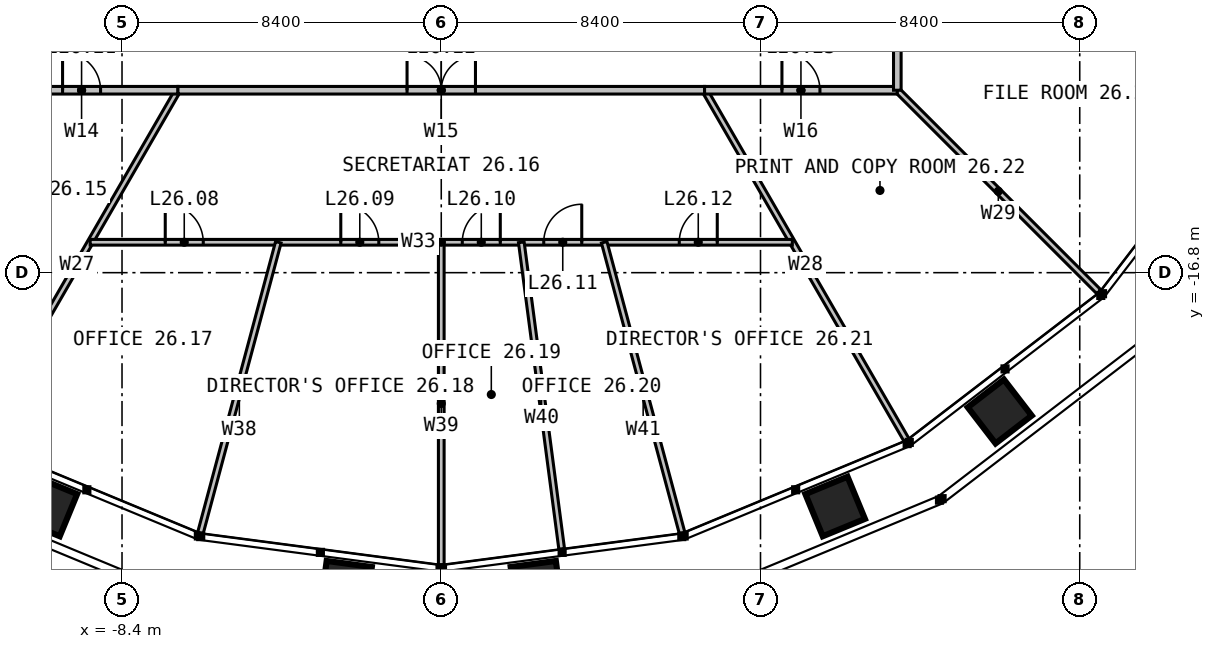
"""IFC4 building model, lengths in metres.
Left out: names, types, materials, properties, quantities, classifications, styles, units other than length and angle.
Written with IfcOpenShell. Run it as: python <this file> out.ifc"""

import sys

from ifc_helpers import new_model, si_unit, direction, frame, frame_2d, origin, place, context, subcontext, project, spatial, rectangle, extrude, element, fill, save


model = new_model("IFC4")
c1 = context("Model", 3, precision=1e-05, world=origin(), true_north=direction((0.0, 1.0)))
c2 = subcontext(c1, "Body", "Model", "MODEL_VIEW")
j1 = project(units=[si_unit("LENGTHUNIT", "METRE"), si_unit("PLANEANGLEUNIT", "RADIAN")], contexts=[c1])
p1 = place(None, origin())
s1 = spatial("IfcSite", under=j1, at=p1, CompositionType="ELEMENT")
p2 = place(p1, origin())
s2 = spatial("IfcBuilding", under=s1, at=p2, CompositionType="ELEMENT")
p3 = place(p2, frame((0.0, 0.0, 110.0)))
s3 = spatial("IfcBuildingStorey", under=s2, at=p3, CompositionType="ELEMENT", Elevation=110.0)
for number, where, z_axis, x_axis in (
    (1, (12.0, -6.928, 0.0), (0.0, 0.0, 1.0), (0.866, -0.5, 0.0)),
    (2, (-6.928, -12.0, 0.0), (0.0, 0.0, 1.0), (-0.5, -0.866, 0.0)),
    (3, (6.928, -12.0, 0.0), (0.0, 0.0, 1.0), (0.5, -0.866, 0.0)),
):
    element("IfcWall", number, at=place(p3, frame(where, z_axis=z_axis, x_axis=x_axis)), inside=s3, PredefinedType="PARTITIONING", context=c2, shape_type="SweptSolid", body=[
        extrude(rectangle(XDim=10.631, YDim=0.15, at=frame_2d((5.315, 0.0))), origin(), (0.0, 0.0, 1.0), 2.79),
    ])
p4 = place(p3, frame((12.0, -12.0, 0.0), z_axis=(0.0, 0.0, 1.0), x_axis=(0.707106781187, -0.707106781187, 0.0)))
e4 = element("IfcWall", 4, at=p4, inside=s3, PredefinedType="PARTITIONING", context=c2, shape_type="SweptSolid", body=[
    extrude(rectangle(XDim=7.517, YDim=0.15, at=frame_2d((3.758, 0.0))), origin(), (0.0, 0.0, 1.0), 2.79),
])
p5 = place(p3, frame((-12.0, -12.0, 0.0), z_axis=(0.0, 0.0, 1.0), x_axis=(1.0, 0.0, 0.0)))
e5 = element("IfcWall", 5, at=p5, inside=s3, PredefinedType="PARTITIONING", context=c2, shape_type="SweptSolid", body=[
    extrude(rectangle(XDim=5.072, YDim=0.2, at=frame_2d((2.536, 0.0))), origin(), (0.0, 0.0, 1.0), 3.8),
])
p6 = place(p5, frame((2.036, 0.0, 0.0)))
e6 = element("IfcOpeningElement", 6, at=p6, cuts=e5, PredefinedType="OPENING", context=c2, shape_type="SweptSolid", body=[
    extrude(rectangle(XDim=1.0, YDim=2.2, at=frame_2d((0.5, 1.1))), frame((0.0, 0.11, 0.0), z_axis=(0.0, -1.0, 0.0), x_axis=(1.0, 0.0, 0.0)), (0.0, 0.0, 1.0), 0.22),
])
p7 = place(p3, frame((-9.238, -16.0, 0.0), z_axis=(0.0, 0.0, 1.0), x_axis=(1.0, 0.0, 0.0)))
e7 = element("IfcWall", 7, at=p7, inside=s3, PredefinedType="PARTITIONING", context=c2, shape_type="SweptSolid", body=[
    extrude(rectangle(XDim=18.475, YDim=0.15, at=frame_2d((9.238, 0.0))), origin(), (0.0, 0.0, 1.0), 2.79),
])
p8 = place(p7, frame((1.975, 0.0, 0.0)))
e8 = element("IfcOpeningElement", 8, at=p8, cuts=e7, PredefinedType="OPENING", context=c2, shape_type="SweptSolid", body=[
    extrude(rectangle(XDim=1.0, YDim=2.2, at=frame_2d((0.5, 1.1))), frame((0.0, 0.085, 0.0), z_axis=(0.0, -1.0, 0.0), x_axis=(1.0, 0.0, 0.0)), (0.0, 0.0, 1.0), 0.17),
])
p9 = place(p7, frame((6.594, 0.0, 0.0)))
e9 = element("IfcOpeningElement", 9, at=p9, cuts=e7, PredefinedType="OPENING", context=c2, shape_type="SweptSolid", body=[
    extrude(rectangle(XDim=1.0, YDim=2.2, at=frame_2d((0.5, 1.1))), frame((0.0, 0.085, 0.0), z_axis=(0.0, -1.0, 0.0), x_axis=(1.0, 0.0, 0.0)), (0.0, 0.0, 1.0), 0.17),
])
p10 = place(p7, frame((9.791, 0.0, 0.0)))
e10 = element("IfcOpeningElement", 10, at=p10, cuts=e7, PredefinedType="OPENING", context=c2, shape_type="SweptSolid", body=[
    extrude(rectangle(XDim=1.0, YDim=2.2, at=frame_2d((0.5, 1.1))), frame((0.0, 0.085, 0.0), z_axis=(0.0, -1.0, 0.0), x_axis=(1.0, 0.0, 0.0)), (0.0, 0.0, 1.0), 0.17),
])
p11 = place(p7, frame((11.934, 0.0, 0.0)))
e11 = element("IfcOpeningElement", 11, at=p11, cuts=e7, PredefinedType="OPENING", context=c2, shape_type="SweptSolid", body=[
    extrude(rectangle(XDim=1.0, YDim=2.2, at=frame_2d((0.5, 1.1))), frame((0.0, 0.085, 0.0), z_axis=(0.0, -1.0, 0.0), x_axis=(1.0, 0.0, 0.0)), (0.0, 0.0, 1.0), 0.17),
])
p12 = place(p7, frame((15.5, 0.0, 0.0)))
e12 = element("IfcOpeningElement", 12, at=p12, cuts=e7, PredefinedType="OPENING", context=c2, shape_type="SweptSolid", body=[
    extrude(rectangle(XDim=1.0, YDim=2.2, at=frame_2d((0.5, 1.1))), frame((0.0, 0.085, 0.0), z_axis=(0.0, -1.0, 0.0), x_axis=(1.0, 0.0, 0.0)), (0.0, 0.0, 1.0), 0.17),
])
p13 = place(p3, frame((-4.287, -16.0, 0.0), z_axis=(0.0, 0.0, 1.0), x_axis=(-0.258815152648, -0.965926869261, 0.0)))
e13 = element("IfcWall", 13, at=p13, inside=s3, PredefinedType="PARTITIONING", context=c2, shape_type="SweptSolid", body=[
    extrude(rectangle(XDim=7.923, YDim=0.15, at=frame_2d((3.961, 0.0))), origin(), (0.0, 0.0, 1.0), 2.79),
])
p14 = place(p3, frame((0.0, -16.0, 0.0), z_axis=(0.0, 0.0, 1.0), x_axis=(0.0, -1.0, 0.0)))
e14 = element("IfcWall", 14, at=p14, inside=s3, PredefinedType="PARTITIONING", context=c2, shape_type="SweptSolid", body=[
    extrude(rectangle(XDim=8.487, YDim=0.15, at=frame_2d((4.244, 0.0))), origin(), (0.0, 0.0, 1.0), 2.79),
])
p15 = place(p3, frame((2.106, -16.0, 0.0), z_axis=(0.0, 0.0, 1.0), x_axis=(0.13053287573, -0.99144398145, 0.0)))
e15 = element("IfcWall", 15, at=p15, inside=s3, PredefinedType="PARTITIONING", context=c2, shape_type="SweptSolid", body=[
    extrude(rectangle(XDim=8.14, YDim=0.15, at=frame_2d((4.07, 0.0))), origin(), (0.0, 0.0, 1.0), 2.79),
])
p16 = place(p3, frame((4.287, -16.0, 0.0), z_axis=(0.0, 0.0, 1.0), x_axis=(0.258815152648, -0.965926869261, 0.0)))
e16 = element("IfcWall", 16, at=p16, inside=s3, PredefinedType="PARTITIONING", context=c2, shape_type="SweptSolid", body=[
    extrude(rectangle(XDim=7.923, YDim=0.15, at=frame_2d((3.961, 0.0))), origin(), (0.0, 0.0, 1.0), 2.79),
])
p17 = place(p3, frame((-6.928, -12.0, 0.0), z_axis=(0.0, 0.0, 1.0), x_axis=(1.0, 0.0, 0.0)))
e17 = element("IfcWall", 17, at=p17, inside=s3, PredefinedType="PARTITIONING", context=c2, shape_type="SweptSolid", body=[
    extrude(rectangle(XDim=13.856, YDim=0.2, at=frame_2d((6.928, 0.0))), origin(), (0.0, 0.0, 1.0), 3.8),
])
p18 = place(p17, frame((6.028, 0.0, 0.0)))
e18 = element("IfcOpeningElement", 18, at=p18, cuts=e17, PredefinedType="OPENING", context=c2, shape_type="SweptSolid", body=[
    extrude(rectangle(XDim=1.8, YDim=2.2, at=frame_2d((0.9, 1.1))), frame((0.0, 0.11, 0.0), z_axis=(0.0, -1.0, 0.0), x_axis=(1.0, 0.0, 0.0)), (0.0, 0.0, 1.0), 0.22),
])
p19 = place(p3, frame((6.928, -12.0, 0.0), z_axis=(0.0, 0.0, 1.0), x_axis=(1.0, 0.0, 0.0)))
e19 = element("IfcWall", 19, at=p19, inside=s3, PredefinedType="PARTITIONING", context=c2, shape_type="SweptSolid", body=[
    extrude(rectangle(XDim=5.072, YDim=0.2, at=frame_2d((2.536, 0.0))), origin(), (0.0, 0.0, 1.0), 3.8),
])
p20 = place(p19, frame((2.036, 0.0, 0.0)))
e20 = element("IfcOpeningElement", 20, at=p20, cuts=e19, PredefinedType="OPENING", context=c2, shape_type="SweptSolid", body=[
    extrude(rectangle(XDim=1.0, YDim=2.2, at=frame_2d((0.5, 1.1))), frame((0.0, 0.11, 0.0), z_axis=(0.0, -1.0, 0.0), x_axis=(1.0, 0.0, 0.0)), (0.0, 0.0, 1.0), 0.22),
])
p21 = place(p3, frame((12.0, -12.0, 0.0), z_axis=(0.0, 0.0, 1.0), x_axis=(0.0, 1.0, 0.0)))
e21 = element("IfcWall", 21, at=p21, inside=s3, PredefinedType="PARTITIONING", context=c2, shape_type="SweptSolid", body=[
    extrude(rectangle(XDim=5.072, YDim=0.2, at=frame_2d((2.536, 0.0))), origin(), (0.0, 0.0, 1.0), 3.8),
])
p22 = place(p21, frame((2.036, 0.0, 0.0)))
e22 = element("IfcOpeningElement", 22, at=p22, cuts=e21, PredefinedType="OPENING", context=c2, shape_type="SweptSolid", body=[
    extrude(rectangle(XDim=1.0, YDim=2.2, at=frame_2d((0.5, 1.1))), frame((0.0, 0.11, 0.0), z_axis=(0.0, -1.0, 0.0), x_axis=(1.0, 0.0, 0.0)), (0.0, 0.0, 1.0), 0.22),
])
p23 = place(p6, origin())
e23 = element("IfcDoor", 23, at=p23, inside=s3, OperationType="SINGLE_SWING_LEFT", PredefinedType="DOOR", context=c2, shape_type="SweptSolid", body=[
    extrude(rectangle(XDim=1.0, YDim=2.2, at=frame_2d((0.5, 1.1))), frame((0.0, 0.025, 0.0), z_axis=(0.0, -1.0, 0.0), x_axis=(1.0, 0.0, 0.0)), (0.0, 0.0, 1.0), 0.05),
])
fill(e6, e23)
p24 = place(p8, origin())
e24 = element("IfcDoor", 24, at=p24, inside=s3, OperationType="SINGLE_SWING_LEFT", PredefinedType="DOOR", context=c2, shape_type="SweptSolid", body=[
    extrude(rectangle(XDim=1.0, YDim=2.2, at=frame_2d((0.5, 1.1))), frame((0.0, 0.025, 0.0), z_axis=(0.0, -1.0, 0.0), x_axis=(1.0, 0.0, 0.0)), (0.0, 0.0, 1.0), 0.05),
])
fill(e8, e24)
p25 = place(p9, origin())
e25 = element("IfcDoor", 25, at=p25, inside=s3, OperationType="SINGLE_SWING_LEFT", PredefinedType="DOOR", context=c2, shape_type="SweptSolid", body=[
    extrude(rectangle(XDim=1.0, YDim=2.2, at=frame_2d((0.5, 1.1))), frame((0.0, 0.025, 0.0), z_axis=(0.0, -1.0, 0.0), x_axis=(1.0, 0.0, 0.0)), (0.0, 0.0, 1.0), 0.05),
])
fill(e9, e25)
p26 = place(p10, origin())
e26 = element("IfcDoor", 26, at=p26, inside=s3, OperationType="SINGLE_SWING_RIGHT", PredefinedType="DOOR", context=c2, shape_type="SweptSolid", body=[
    extrude(rectangle(XDim=1.0, YDim=2.2, at=frame_2d((0.5, 1.1))), frame((0.0, 0.025, 0.0), z_axis=(0.0, -1.0, 0.0), x_axis=(1.0, 0.0, 0.0)), (0.0, 0.0, 1.0), 0.05),
])
fill(e10, e26)
p27 = place(p11, origin())
e27 = element("IfcDoor", 27, at=p27, inside=s3, OperationType="SINGLE_SWING_RIGHT", PredefinedType="DOOR", context=c2, shape_type="SweptSolid", body=[
    extrude(rectangle(XDim=1.0, YDim=2.2, at=frame_2d((0.5, 1.1))), frame((0.0, 0.025, 0.0), z_axis=(0.0, -1.0, 0.0), x_axis=(1.0, 0.0, 0.0)), (0.0, 0.0, 1.0), 0.05),
])
fill(e11, e27)
p28 = place(p12, origin())
e28 = element("IfcDoor", 28, at=p28, inside=s3, OperationType="SINGLE_SWING_RIGHT", PredefinedType="DOOR", context=c2, shape_type="SweptSolid", body=[
    extrude(rectangle(XDim=1.0, YDim=2.2, at=frame_2d((0.5, 1.1))), frame((0.0, 0.025, 0.0), z_axis=(0.0, -1.0, 0.0), x_axis=(1.0, 0.0, 0.0)), (0.0, 0.0, 1.0), 0.05),
])
fill(e12, e28)
p29 = place(p18, origin())
e29 = element("IfcDoor", 29, at=p29, inside=s3, OperationType="DOUBLE_DOOR_SINGLE_SWING", PredefinedType="DOOR", context=c2, shape_type="SweptSolid", body=[
    extrude(rectangle(XDim=1.8, YDim=2.2, at=frame_2d((0.9, 1.1))), frame((0.0, 0.025, 0.0), z_axis=(0.0, -1.0, 0.0), x_axis=(1.0, 0.0, 0.0)), (0.0, 0.0, 1.0), 0.05),
])
fill(e18, e29)
p30 = place(p20, origin())
e30 = element("IfcDoor", 30, at=p30, inside=s3, OperationType="SINGLE_SWING_LEFT", PredefinedType="DOOR", context=c2, shape_type="SweptSolid", body=[
    extrude(rectangle(XDim=1.0, YDim=2.2, at=frame_2d((0.5, 1.1))), frame((0.0, 0.025, 0.0), z_axis=(0.0, -1.0, 0.0), x_axis=(1.0, 0.0, 0.0)), (0.0, 0.0, 1.0), 0.05),
])
fill(e20, e30)
save(model, sys.argv[1])
